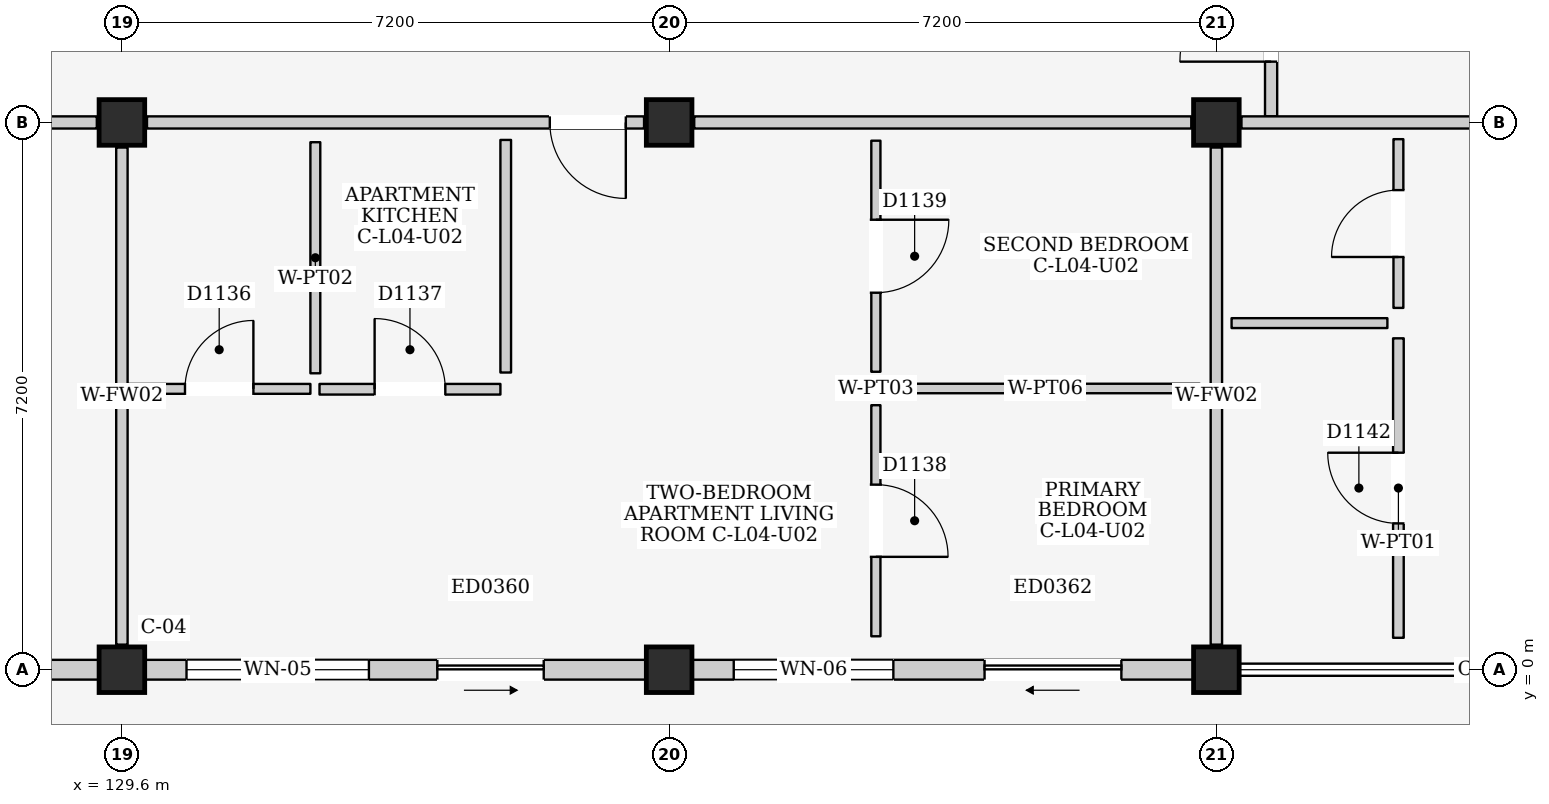
"""IFC4 building model, lengths in metres.
Left out: names, types, materials, properties, quantities, classifications, styles, units other than length and angle.
Written with IfcOpenShell. Run it as: python <this file> out.ifc"""

import sys

from ifc_helpers import new_model, si_unit, direction, frame, frame_2d, origin, origin_2d, place, context, subcontext, project, spatial, rectangle, extrude, element, fill, save


model = new_model("IFC4")
c1 = context("Model", 3, precision=1e-05, world=origin(), true_north=direction((0.0, 1.0)))
c2 = subcontext(c1, "Body", "Model", "MODEL_VIEW")
j1 = project(units=[si_unit("LENGTHUNIT", "METRE"), si_unit("PLANEANGLEUNIT", "RADIAN")], contexts=[c1])
p1 = place(None, origin())
s1 = spatial("IfcSite", under=j1, at=p1, CompositionType="ELEMENT")
p2 = place(p1, origin())
s2 = spatial("IfcBuilding", under=s1, at=p2, CompositionType="ELEMENT")
p3 = place(p2, frame((0.0, 0.0, 15.4)))
s3 = spatial("IfcBuildingStorey", under=s2, at=p3, CompositionType="ELEMENT", Elevation=15.4)
for number, where, z_axis, x_axis in (
    (1, (129.6, 0.0, 0.0), (0.0, 0.0, 1.0), (1.0, 0.0, 0.0)),
    (2, (129.6, 7.2, 0.0), (0.0, 0.0, 1.0), (1.0, 0.0, 0.0)),
    (3, (136.8, 0.0, 0.0), (0.0, 0.0, 1.0), (1.0, 0.0, 0.0)),
    (4, (136.8, 7.2, 0.0), (0.0, 0.0, 1.0), (1.0, 0.0, 0.0)),
    (5, (144.0, 0.0, 0.0), (0.0, 0.0, 1.0), (1.0, 0.0, 0.0)),
    (6, (144.0, 7.2, 0.0), (0.0, 0.0, 1.0), (1.0, 0.0, 0.0)),
):
    element("IfcColumn", number, at=place(p3, frame(where, z_axis=z_axis, x_axis=x_axis)), inside=s3, PredefinedType="COLUMN", context=c2, shape_type="SweptSolid", body=[
        extrude(rectangle(XDim=0.6, YDim=0.6, at=origin_2d()), origin(), (0.0, 0.0, 1.0), 3.2),
    ])
p4 = place(p3, frame((122.7, 0.0, 0.0), z_axis=(0.0, 0.0, 1.0), x_axis=(1.0, 0.0, 0.0)))
e7 = element("IfcWall", 7, at=p4, inside=s3, PredefinedType="ELEMENTEDWALL", context=c2, shape_type="SweptSolid", body=[
    extrude(rectangle(XDim=6.6, YDim=0.26, at=frame_2d((3.3, 0.0))), origin(), (0.0, 0.0, 1.0), 2.43),
])
p5 = place(p4, frame((3.85, 0.0, 0.0)))
e8 = element("IfcOpeningElement", 8, at=p5, cuts=e7, PredefinedType="OPENING", context=c2, shape_type="SweptSolid", body=[
    extrude(rectangle(XDim=2.0, YDim=2.12, at=frame_2d((1.0, 1.06))), frame((0.0, 0.145, 0.0), z_axis=(0.0, -1.0, 0.0), x_axis=(1.0, 0.0, 0.0)), (0.0, 0.0, 1.0), 0.29),
])
p6 = place(p4, frame((0.55, 0.0, 0.9)))
e9 = element("IfcOpeningElement", 9, at=p6, cuts=e7, PredefinedType="OPENING", context=c2, shape_type="SweptSolid", body=[
    extrude(rectangle(XDim=0.9, YDim=1.1, at=frame_2d((0.45, 0.55))), frame((0.0, 0.145, 0.0), z_axis=(0.0, -1.0, 0.0), x_axis=(1.0, 0.0, 0.0)), (0.0, 0.0, 1.0), 0.29),
])
p7 = place(p3, frame((129.9, 0.0, 0.0), z_axis=(0.0, 0.0, 1.0), x_axis=(1.0, 0.0, 0.0)))
e10 = element("IfcWall", 10, at=p7, inside=s3, PredefinedType="ELEMENTEDWALL", context=c2, shape_type="SweptSolid", body=[
    extrude(rectangle(XDim=6.6, YDim=0.26, at=frame_2d((3.3, 0.0))), origin(), (0.0, 0.0, 1.0), 2.43),
])
p8 = place(p7, frame((3.85, 0.0, 0.0)))
e11 = element("IfcOpeningElement", 11, at=p8, cuts=e10, PredefinedType="OPENING", context=c2, shape_type="SweptSolid", body=[
    extrude(rectangle(XDim=1.4, YDim=2.1, at=frame_2d((0.7, 1.05))), frame((0.0, 0.145, 0.0), z_axis=(0.0, -1.0, 0.0), x_axis=(1.0, 0.0, 0.0)), (0.0, 0.0, 1.0), 0.29),
])
p9 = place(p7, frame((0.55, 0.0, 0.66)))
e12 = element("IfcOpeningElement", 12, at=p9, cuts=e10, PredefinedType="OPENING", context=c2, shape_type="SweptSolid", body=[
    extrude(rectangle(XDim=2.4, YDim=1.65, at=frame_2d((1.2, 0.825))), frame((0.0, 0.145, 0.0), z_axis=(0.0, -1.0, 0.0), x_axis=(1.0, 0.0, 0.0)), (0.0, 0.0, 1.0), 0.29),
])
p10 = place(p3, frame((137.1, 0.0, 0.0), z_axis=(0.0, 0.0, 1.0), x_axis=(1.0, 0.0, 0.0)))
e13 = element("IfcWall", 13, at=p10, inside=s3, PredefinedType="ELEMENTEDWALL", context=c2, shape_type="SweptSolid", body=[
    extrude(rectangle(XDim=6.6, YDim=0.26, at=frame_2d((3.3, 0.0))), origin(), (0.0, 0.0, 1.0), 2.43),
])
p11 = place(p10, frame((3.85, 0.0, 0.0)))
e14 = element("IfcOpeningElement", 14, at=p11, cuts=e13, PredefinedType="OPENING", context=c2, shape_type="SweptSolid", body=[
    extrude(rectangle(XDim=1.8, YDim=2.12, at=frame_2d((0.9, 1.06))), frame((0.0, 0.145, 0.0), z_axis=(0.0, -1.0, 0.0), x_axis=(1.0, 0.0, 0.0)), (0.0, 0.0, 1.0), 0.29),
])
p12 = place(p10, frame((0.55, 0.0, 0.66)))
e15 = element("IfcOpeningElement", 15, at=p12, cuts=e13, PredefinedType="OPENING", context=c2, shape_type="SweptSolid", body=[
    extrude(rectangle(XDim=2.1, YDim=1.65, at=frame_2d((1.05, 0.825))), frame((0.0, 0.145, 0.0), z_axis=(0.0, -1.0, 0.0), x_axis=(1.0, 0.0, 0.0)), (0.0, 0.0, 1.0), 0.29),
])
p13 = place(p3, frame((144.72, 7.28, 0.0), z_axis=(0.0, 0.0, 1.0), x_axis=(0.0, 1.0, 0.0)))
e16 = element("IfcWall", 16, at=p13, inside=s3, PredefinedType="PARTITIONING", context=c2, shape_type="SweptSolid", body=[
    extrude(rectangle(XDim=4.32, YDim=0.16, at=frame_2d((2.16, 0.0))), origin(), (0.0, 0.0, 1.0), 2.95),
])
p14 = place(p13, frame((0.72, 0.0, 0.0)))
e17 = element("IfcOpeningElement", 17, at=p14, cuts=e16, PredefinedType="OPENING", context=c2, shape_type="SweptSolid", body=[
    extrude(rectangle(XDim=1.2, YDim=2.2, at=frame_2d((0.6, 1.1))), frame((0.0, 0.095, 0.0), z_axis=(0.0, -1.0, 0.0), x_axis=(1.0, 0.0, 0.0)), (0.0, 0.0, 1.0), 0.19),
])
p15 = place(p3, frame((122.73, 7.2, 0.0), z_axis=(0.0, 0.0, 1.0), x_axis=(1.0, 0.0, 0.0)))
e18 = element("IfcWall", 18, at=p15, inside=s3, PredefinedType="PARTITIONING", context=c2, shape_type="SweptSolid", body=[
    extrude(rectangle(XDim=6.54, YDim=0.16, at=frame_2d((3.27, 0.0))), origin(), (0.0, 0.0, 1.0), 2.335),
])
p16 = place(p15, frame((4.095, 0.0, 0.0)))
e19 = element("IfcOpeningElement", 19, at=p16, cuts=e18, PredefinedType="OPENING", context=c2, shape_type="SweptSolid", body=[
    extrude(rectangle(XDim=1.05, YDim=2.2, at=frame_2d((0.525, 1.1))), frame((0.0, 0.095, 0.0), z_axis=(0.0, -1.0, 0.0), x_axis=(1.0, 0.0, 0.0)), (0.0, 0.0, 1.0), 0.19),
])
p17 = place(p3, frame((129.6, 0.33, 0.0), z_axis=(0.0, 0.0, 1.0), x_axis=(0.0, 1.0, 0.0)))
e20 = element("IfcWall", 20, at=p17, inside=s3, PredefinedType="PARTITIONING", context=c2, shape_type="SweptSolid", body=[
    extrude(rectangle(XDim=6.54, YDim=0.15, at=frame_2d((3.27, 0.0))), origin(), (0.0, 0.0, 1.0), 2.385),
])
p18 = place(p3, frame((129.93, 7.2, 0.0), z_axis=(0.0, 0.0, 1.0), x_axis=(1.0, 0.0, 0.0)))
e21 = element("IfcWall", 21, at=p18, inside=s3, PredefinedType="PARTITIONING", context=c2, shape_type="SweptSolid", body=[
    extrude(rectangle(XDim=6.54, YDim=0.16, at=frame_2d((3.27, 0.0))), origin(), (0.0, 0.0, 1.0), 2.335),
])
p19 = place(p18, frame((5.3, 0.0, 0.0)))
e22 = element("IfcOpeningElement", 22, at=p19, cuts=e21, PredefinedType="OPENING", context=c2, shape_type="SweptSolid", body=[
    extrude(rectangle(XDim=1.0, YDim=2.15, at=frame_2d((0.5, 1.075))), frame((0.0, 0.095, 0.0), z_axis=(0.0, -1.0, 0.0), x_axis=(1.0, 0.0, 0.0)), (0.0, 0.0, 1.0), 0.19),
])
p20 = place(p3, frame((137.13, 7.2, 0.0), z_axis=(0.0, 0.0, 1.0), x_axis=(1.0, 0.0, 0.0)))
e23 = element("IfcWall", 23, at=p20, inside=s3, PredefinedType="PARTITIONING", context=c2, shape_type="SweptSolid", body=[
    extrude(rectangle(XDim=6.54, YDim=0.16, at=frame_2d((3.27, 0.0))), origin(), (0.0, 0.0, 1.0), 2.335),
])
p21 = place(p3, frame((144.0, 0.33, 0.0), z_axis=(0.0, 0.0, 1.0), x_axis=(0.0, 1.0, 0.0)))
e24 = element("IfcWall", 24, at=p21, inside=s3, PredefinedType="PARTITIONING", context=c2, shape_type="SweptSolid", body=[
    extrude(rectangle(XDim=6.54, YDim=0.15, at=frame_2d((3.27, 0.0))), origin(), (0.0, 0.0, 1.0), 2.385),
])
p22 = place(p3, frame((129.68, 3.695, 0.0), z_axis=(0.0, 0.0, 1.0), x_axis=(1.0, 0.0, 0.0)))
e25 = element("IfcWall", 25, at=p22, inside=s3, PredefinedType="PARTITIONING", context=c2, shape_type="SweptSolid", body=[
    extrude(rectangle(XDim=2.4, YDim=0.13, at=frame_2d((1.2, 0.0))), origin(), (0.0, 0.0, 1.0), 2.95),
])
p23 = place(p22, frame((0.75, 0.0, 0.0)))
e26 = element("IfcOpeningElement", 26, at=p23, cuts=e25, PredefinedType="OPENING", context=c2, shape_type="SweptSolid", body=[
    extrude(rectangle(XDim=0.9, YDim=2.1, at=frame_2d((0.45, 1.05))), frame((0.0, 0.08, 0.0), z_axis=(0.0, -1.0, 0.0), x_axis=(1.0, 0.0, 0.0)), (0.0, 0.0, 1.0), 0.16),
])
p24 = place(p3, frame((132.145, 3.9, 0.0), z_axis=(0.0, 0.0, 1.0), x_axis=(0.0, 1.0, 0.0)))
e27 = element("IfcWall", 27, at=p24, inside=s3, PredefinedType="PARTITIONING", context=c2, shape_type="SweptSolid", body=[
    extrude(rectangle(XDim=3.04, YDim=0.13, at=frame_2d((1.52, 0.0))), origin(), (0.0, 0.0, 1.0), 2.95),
])
p25 = place(p3, frame((132.2, 3.69, 0.0), z_axis=(0.0, 0.0, 1.0), x_axis=(1.0, 0.0, 0.0)))
e28 = element("IfcWall", 28, at=p25, inside=s3, PredefinedType="PARTITIONING", context=c2, shape_type="SweptSolid", body=[
    extrude(rectangle(XDim=2.38, YDim=0.14, at=frame_2d((1.19, 0.0))), origin(), (0.0, 0.0, 1.0), 2.95),
])
p26 = place(p25, frame((0.725, 0.0, 0.0)))
e29 = element("IfcOpeningElement", 29, at=p26, cuts=e28, PredefinedType="OPENING", context=c2, shape_type="SweptSolid", body=[
    extrude(rectangle(XDim=0.93, YDim=2.14, at=frame_2d((0.465, 1.07))), frame((0.0, 0.085, 0.0), z_axis=(0.0, -1.0, 0.0), x_axis=(1.0, 0.0, 0.0)), (0.0, 0.0, 1.0), 0.17),
])
p27 = place(p3, frame((134.65, 3.91, 0.0), z_axis=(0.0, 0.0, 1.0), x_axis=(0.0, 1.0, 0.0)))
e30 = element("IfcWall", 30, at=p27, inside=s3, PredefinedType="PARTITIONING", context=c2, shape_type="SweptSolid", body=[
    extrude(rectangle(XDim=3.06, YDim=0.14, at=frame_2d((1.53, 0.0))), origin(), (0.0, 0.0, 1.0), 2.95),
])
p28 = place(p3, frame((139.52, 0.44, 0.0), z_axis=(0.0, 0.0, 1.0), x_axis=(0.0, 1.0, 0.0)))
e31 = element("IfcWall", 31, at=p28, inside=s3, PredefinedType="PARTITIONING", context=c2, shape_type="SweptSolid", body=[
    extrude(rectangle(XDim=3.04, YDim=0.12, at=frame_2d((1.52, 0.0))), origin(), (0.0, 0.0, 1.0), 2.95),
])
p29 = place(p28, frame((1.045, 0.0, 0.0)))
e32 = element("IfcOpeningElement", 32, at=p29, cuts=e31, PredefinedType="OPENING", context=c2, shape_type="SweptSolid", body=[
    extrude(rectangle(XDim=0.95, YDim=2.15, at=frame_2d((0.475, 1.075))), frame((0.0, 0.075, 0.0), z_axis=(0.0, -1.0, 0.0), x_axis=(1.0, 0.0, 0.0)), (0.0, 0.0, 1.0), 0.15),
])
p30 = place(p3, frame((139.72, 3.7, 0.0), z_axis=(0.0, 0.0, 1.0), x_axis=(1.0, 0.0, 0.0)))
e33 = element("IfcWall", 33, at=p30, inside=s3, PredefinedType="PARTITIONING", context=c2, shape_type="SweptSolid", body=[
    extrude(rectangle(XDim=4.06, YDim=0.125, at=frame_2d((2.03, 0.0))), origin(), (0.0, 0.0, 1.0), 2.95),
])
p31 = place(p3, frame((139.52, 3.92, 0.0), z_axis=(0.0, 0.0, 1.0), x_axis=(0.0, 1.0, 0.0)))
e34 = element("IfcWall", 34, at=p31, inside=s3, PredefinedType="PARTITIONING", context=c2, shape_type="SweptSolid", body=[
    extrude(rectangle(XDim=3.04, YDim=0.12, at=frame_2d((1.52, 0.0))), origin(), (0.0, 0.0, 1.0), 2.95),
])
p32 = place(p31, frame((1.04, 0.0, 0.0)))
e35 = element("IfcOpeningElement", 35, at=p32, cuts=e34, PredefinedType="OPENING", context=c2, shape_type="SweptSolid", body=[
    extrude(rectangle(XDim=0.96, YDim=2.15, at=frame_2d((0.48, 1.075))), frame((0.0, 0.075, 0.0), z_axis=(0.0, -1.0, 0.0), x_axis=(1.0, 0.0, 0.0)), (0.0, 0.0, 1.0), 0.15),
])
p33 = place(p3, frame((144.33, 7.2, 0.0), z_axis=(0.0, 0.0, 1.0), x_axis=(1.0, 0.0, 0.0)))
e36 = element("IfcWall", 36, at=p33, inside=s3, PredefinedType="PARTITIONING", context=c2, shape_type="SweptSolid", body=[
    extrude(rectangle(XDim=6.54, YDim=0.16, at=frame_2d((3.27, 0.0))), origin(), (0.0, 0.0, 1.0), 2.335),
])
p34 = place(p33, frame((4.12, 0.0, 0.0)))
e37 = element("IfcOpeningElement", 37, at=p34, cuts=e36, PredefinedType="OPENING", context=c2, shape_type="SweptSolid", body=[
    extrude(rectangle(XDim=1.0, YDim=2.15, at=frame_2d((0.5, 1.075))), frame((0.0, 0.095, 0.0), z_axis=(0.0, -1.0, 0.0), x_axis=(1.0, 0.0, 0.0)), (0.0, 0.0, 1.0), 0.19),
])
p35 = place(p3, frame((144.2, 4.56, 0.0), z_axis=(0.0, 0.0, 1.0), x_axis=(1.0, 0.0, 0.0)))
e38 = element("IfcWall", 38, at=p35, inside=s3, PredefinedType="PARTITIONING", context=c2, shape_type="SweptSolid", body=[
    extrude(rectangle(XDim=2.05, YDim=0.13, at=frame_2d((1.025, 0.0))), origin(), (0.0, 0.0, 1.0), 2.95),
])
p36 = place(p3, frame((146.395, 4.76, 0.0), z_axis=(0.0, 0.0, 1.0), x_axis=(0.0, 1.0, 0.0)))
e39 = element("IfcWall", 39, at=p36, inside=s3, PredefinedType="PARTITIONING", context=c2, shape_type="SweptSolid", body=[
    extrude(rectangle(XDim=2.22, YDim=0.13, at=frame_2d((1.11, 0.0))), origin(), (0.0, 0.0, 1.0), 2.95),
])
p37 = place(p36, frame((0.67, 0.0, 0.0)))
e40 = element("IfcOpeningElement", 40, at=p37, cuts=e39, PredefinedType="OPENING", context=c2, shape_type="SweptSolid", body=[
    extrude(rectangle(XDim=0.88, YDim=2.1, at=frame_2d((0.44, 1.05))), frame((0.0, 0.08, 0.0), z_axis=(0.0, -1.0, 0.0), x_axis=(1.0, 0.0, 0.0)), (0.0, 0.0, 1.0), 0.16),
])
p38 = place(p3, frame((146.395, 0.42, 0.0), z_axis=(0.0, 0.0, 1.0), x_axis=(0.0, 1.0, 0.0)))
e41 = element("IfcWall", 41, at=p38, inside=s3, PredefinedType="PARTITIONING", context=c2, shape_type="SweptSolid", body=[
    extrude(rectangle(XDim=3.94, YDim=0.14, at=frame_2d((1.97, 0.0))), origin(), (0.0, 0.0, 1.0), 2.95),
])
p39 = place(p38, frame((1.505, 0.0, 0.0)))
e42 = element("IfcOpeningElement", 42, at=p39, cuts=e41, PredefinedType="OPENING", context=c2, shape_type="SweptSolid", body=[
    extrude(rectangle(XDim=0.93, YDim=2.14, at=frame_2d((0.465, 1.07))), frame((0.0, 0.085, 0.0), z_axis=(0.0, -1.0, 0.0), x_axis=(1.0, 0.0, 0.0)), (0.0, 0.0, 1.0), 0.17),
])
p40 = place(p8, frame((1.4, 0.0, 0.0), z_axis=(0.0, 0.0, 1.0), x_axis=(-1.0, 0.0, 0.0)))
e43 = element("IfcDoor", 43, at=p40, inside=s3, OperationType="SLIDING_TO_RIGHT", PredefinedType="DOOR", context=c2, shape_type="SweptSolid", body=[
    extrude(rectangle(XDim=1.4, YDim=2.1, at=frame_2d((0.7, 1.05))), frame((0.0, 0.025, 0.0), z_axis=(0.0, -1.0, 0.0), x_axis=(1.0, 0.0, 0.0)), (0.0, 0.0, 1.0), 0.05),
])
fill(e11, e43)
p41 = place(p9, origin())
e44 = element("IfcWindow", 44, at=p41, inside=s3, PartitioningType="TRIPLE_PANEL_VERTICAL", PredefinedType="WINDOW", context=c2, shape_type="SweptSolid", body=[
    extrude(rectangle(XDim=2.4, YDim=1.65, at=frame_2d((1.2, 0.825))), frame((0.0, 0.03, 0.0), z_axis=(0.0, -1.0, 0.0), x_axis=(1.0, 0.0, 0.0)), (0.0, 0.0, 1.0), 0.06),
])
fill(e12, e44)
p42 = place(p11, frame((1.8, 0.0, 0.0), z_axis=(0.0, 0.0, 1.0), x_axis=(-1.0, 0.0, 0.0)))
e45 = element("IfcDoor", 45, at=p42, inside=s3, OperationType="SLIDING_TO_LEFT", PredefinedType="DOOR", context=c2, shape_type="SweptSolid", body=[
    extrude(rectangle(XDim=1.8, YDim=2.12, at=frame_2d((0.9, 1.06))), frame((0.0, 0.025, 0.0), z_axis=(0.0, -1.0, 0.0), x_axis=(1.0, 0.0, 0.0)), (0.0, 0.0, 1.0), 0.05),
])
fill(e14, e45)
p43 = place(p12, origin())
e46 = element("IfcWindow", 46, at=p43, inside=s3, PartitioningType="DOUBLE_PANEL_VERTICAL", PredefinedType="WINDOW", context=c2, shape_type="SweptSolid", body=[
    extrude(rectangle(XDim=2.1, YDim=1.65, at=frame_2d((1.05, 0.825))), frame((0.0, 0.03, 0.0), z_axis=(0.0, -1.0, 0.0), x_axis=(1.0, 0.0, 0.0)), (0.0, 0.0, 1.0), 0.06),
])
fill(e15, e46)
p44 = place(p14, origin())
e47 = element("IfcDoor", 47, at=p44, inside=s3, OperationType="SINGLE_SWING_LEFT", PredefinedType="DOOR", context=c2, shape_type="SweptSolid", body=[
    extrude(rectangle(XDim=1.2, YDim=2.2, at=frame_2d((0.6, 1.1))), frame((0.0, 0.025, 0.0), z_axis=(0.0, -1.0, 0.0), x_axis=(1.0, 0.0, 0.0)), (0.0, 0.0, 1.0), 0.05),
])
fill(e17, e47)
p45 = place(p19, frame((1.0, 0.0, 0.0), z_axis=(0.0, 0.0, 1.0), x_axis=(-1.0, 0.0, 0.0)))
e48 = element("IfcDoor", 48, at=p45, inside=s3, OperationType="SINGLE_SWING_LEFT", PredefinedType="DOOR", context=c2, shape_type="SweptSolid", body=[
    extrude(rectangle(XDim=1.0, YDim=2.15, at=frame_2d((0.5, 1.075))), frame((0.0, 0.025, 0.0), z_axis=(0.0, -1.0, 0.0), x_axis=(1.0, 0.0, 0.0)), (0.0, 0.0, 1.0), 0.05),
])
fill(e22, e48)
p46 = place(p23, origin())
e49 = element("IfcDoor", 49, at=p46, inside=s3, OperationType="SINGLE_SWING_RIGHT", PredefinedType="DOOR", context=c2, shape_type="SweptSolid", body=[
    extrude(rectangle(XDim=0.9, YDim=2.1, at=frame_2d((0.45, 1.05))), frame((0.0, 0.025, 0.0), z_axis=(0.0, -1.0, 0.0), x_axis=(1.0, 0.0, 0.0)), (0.0, 0.0, 1.0), 0.05),
])
fill(e26, e49)
p47 = place(p26, origin())
e50 = element("IfcDoor", 50, at=p47, inside=s3, OperationType="SINGLE_SWING_LEFT", PredefinedType="DOOR", context=c2, shape_type="SweptSolid", body=[
    extrude(rectangle(XDim=0.93, YDim=2.14, at=frame_2d((0.465, 1.07))), frame((0.0, 0.025, 0.0), z_axis=(0.0, -1.0, 0.0), x_axis=(1.0, 0.0, 0.0)), (0.0, 0.0, 1.0), 0.05),
])
fill(e29, e50)
p48 = place(p29, frame((0.95, 0.0, 0.0), z_axis=(0.0, 0.0, 1.0), x_axis=(-1.0, 0.0, 0.0)))
e51 = element("IfcDoor", 51, at=p48, inside=s3, OperationType="SINGLE_SWING_RIGHT", PredefinedType="DOOR", context=c2, shape_type="SweptSolid", body=[
    extrude(rectangle(XDim=0.95, YDim=2.15, at=frame_2d((0.475, 1.075))), frame((0.0, 0.025, 0.0), z_axis=(0.0, -1.0, 0.0), x_axis=(1.0, 0.0, 0.0)), (0.0, 0.0, 1.0), 0.05),
])
fill(e32, e51)
p49 = place(p32, frame((0.96, 0.0, 0.0), z_axis=(0.0, 0.0, 1.0), x_axis=(-1.0, 0.0, 0.0)))
e52 = element("IfcDoor", 52, at=p49, inside=s3, OperationType="SINGLE_SWING_LEFT", PredefinedType="DOOR", context=c2, shape_type="SweptSolid", body=[
    extrude(rectangle(XDim=0.96, YDim=2.15, at=frame_2d((0.48, 1.075))), frame((0.0, 0.025, 0.0), z_axis=(0.0, -1.0, 0.0), x_axis=(1.0, 0.0, 0.0)), (0.0, 0.0, 1.0), 0.05),
])
fill(e35, e52)
p50 = place(p37, origin())
e53 = element("IfcDoor", 53, at=p50, inside=s3, OperationType="SINGLE_SWING_LEFT", PredefinedType="DOOR", context=c2, shape_type="SweptSolid", body=[
    extrude(rectangle(XDim=0.88, YDim=2.1, at=frame_2d((0.44, 1.05))), frame((0.0, 0.025, 0.0), z_axis=(0.0, -1.0, 0.0), x_axis=(1.0, 0.0, 0.0)), (0.0, 0.0, 1.0), 0.05),
])
fill(e40, e53)
p51 = place(p39, origin())
e54 = element("IfcDoor", 54, at=p51, inside=s3, OperationType="SINGLE_SWING_RIGHT", PredefinedType="DOOR", context=c2, shape_type="SweptSolid", body=[
    extrude(rectangle(XDim=0.93, YDim=2.14, at=frame_2d((0.465, 1.07))), frame((0.0, 0.025, 0.0), z_axis=(0.0, -1.0, 0.0), x_axis=(1.0, 0.0, 0.0)), (0.0, 0.0, 1.0), 0.05),
])
fill(e42, e54)
save(model, sys.argv[1])
